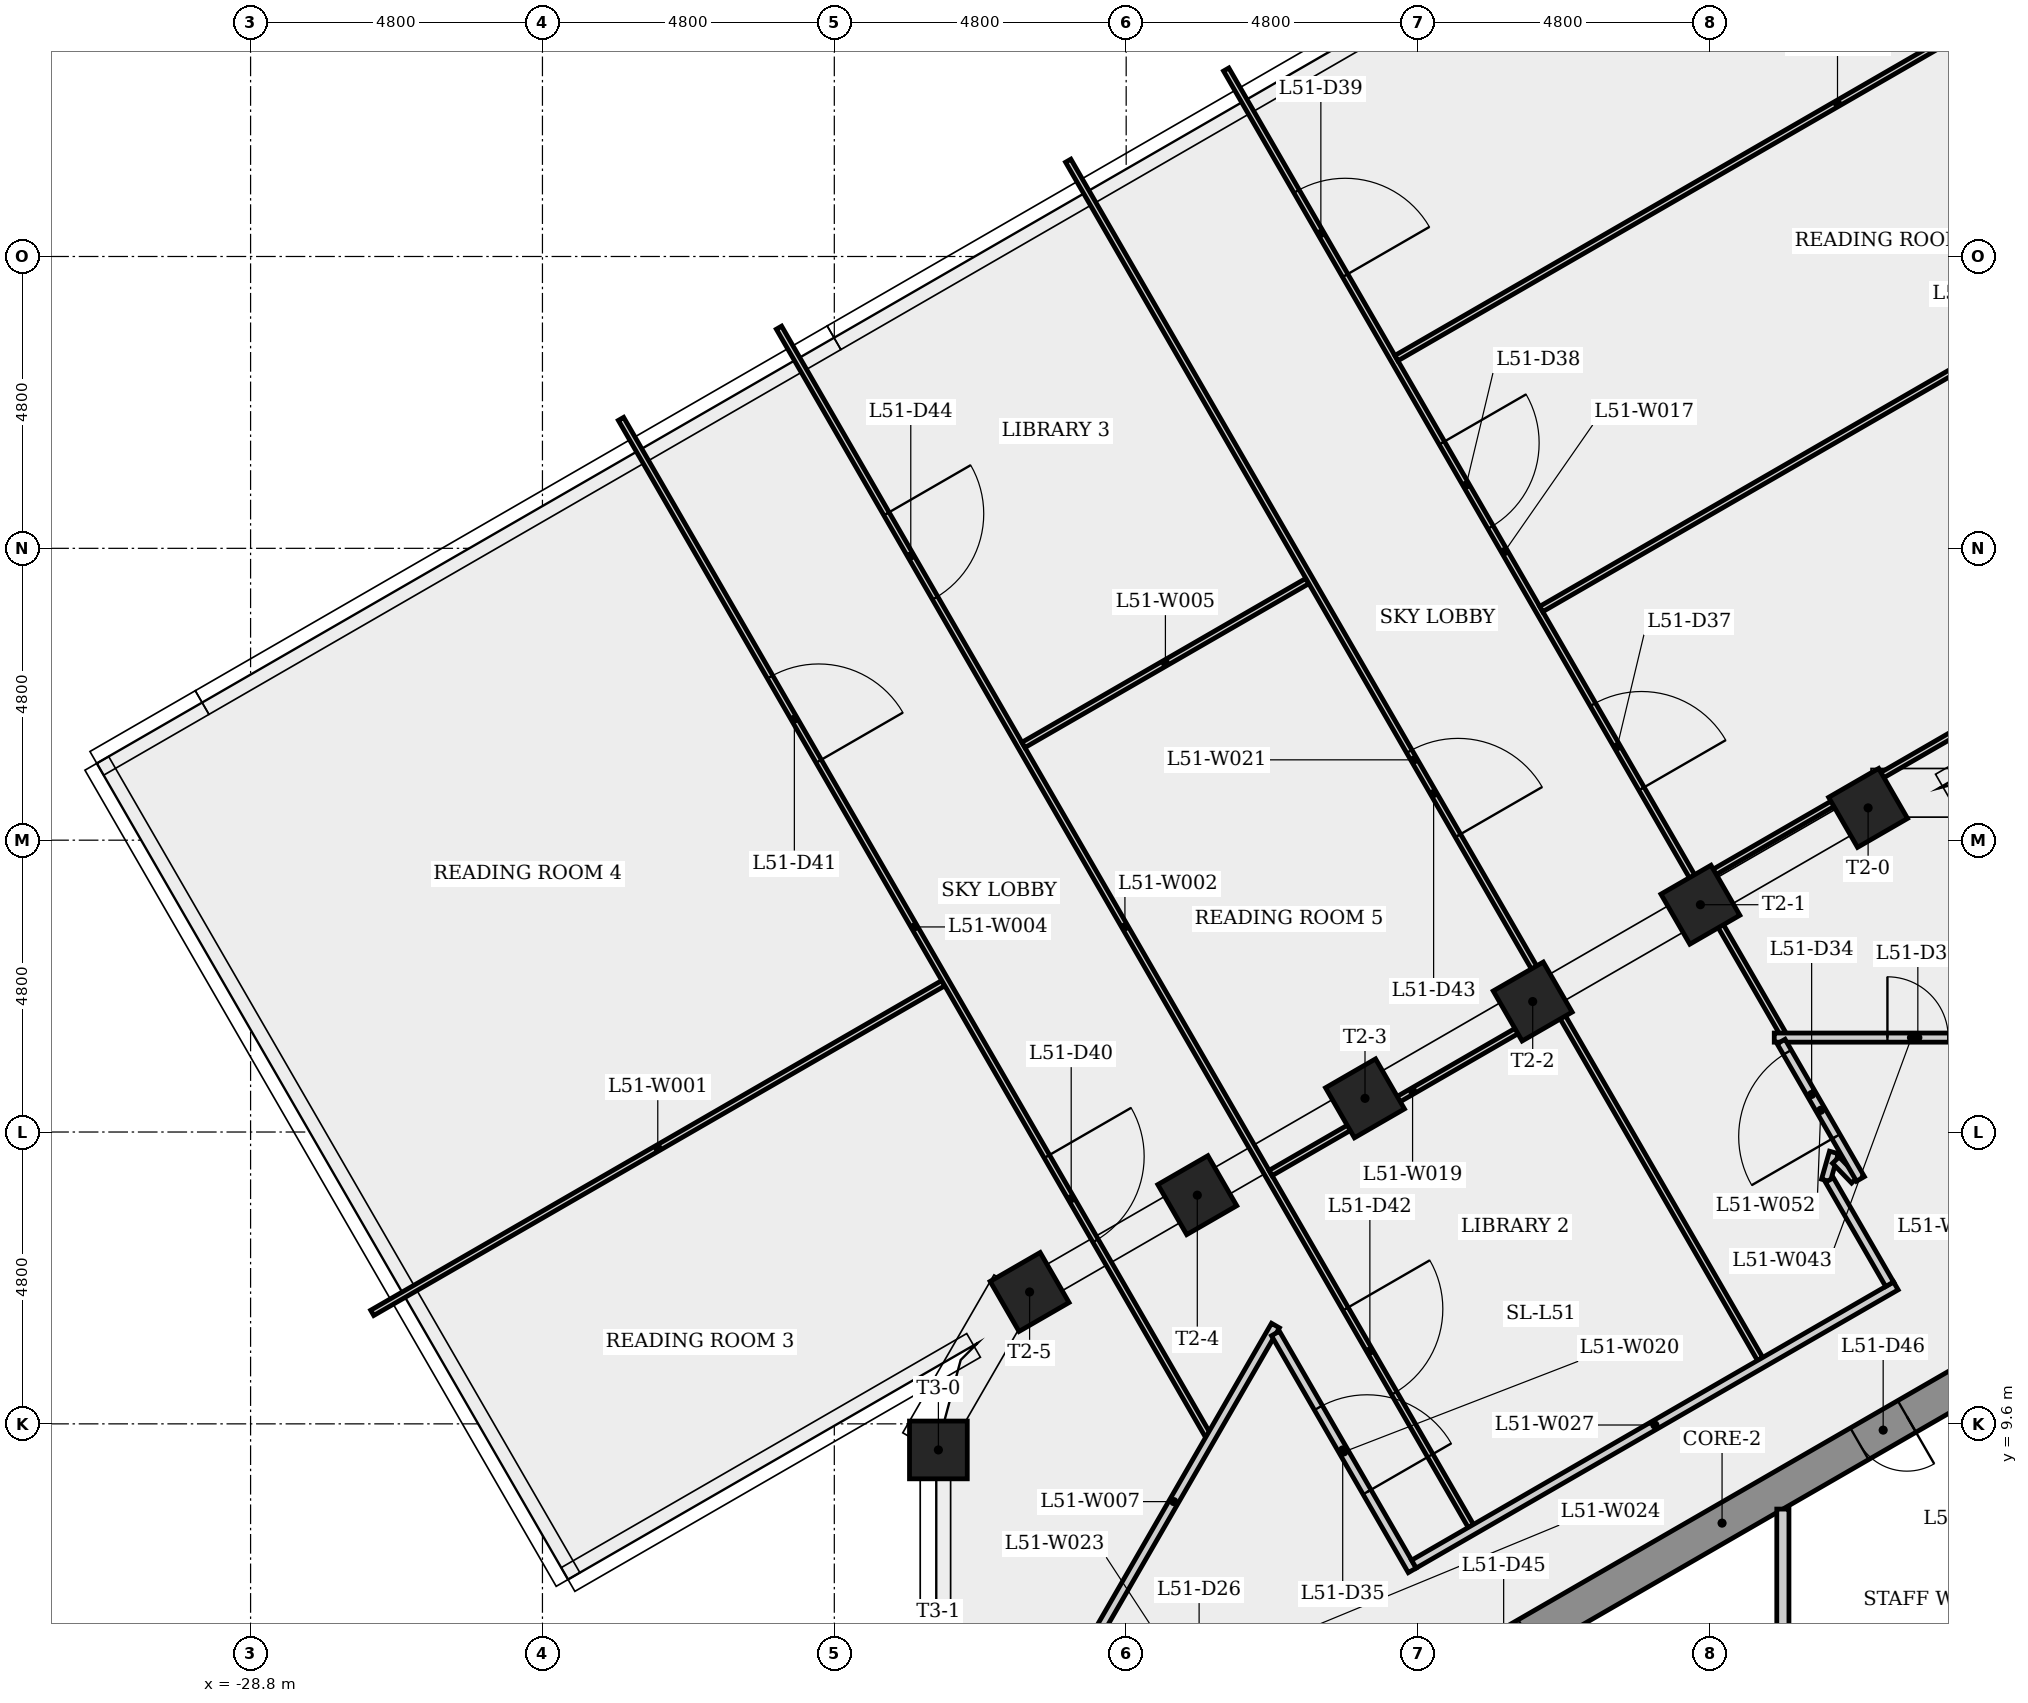
"""IFC4 building model, lengths in metres.
Left out: names, types, materials, properties, quantities, classifications, styles, units other than length and angle.
Written with IfcOpenShell. Run it as: python <this file> out.ifc"""

import sys

from ifc_helpers import new_model, si_unit, direction, frame, frame_2d, origin, origin_2d, place, context, subcontext, project, spatial, rectangle, extrude, element, fill, save


model = new_model("IFC4")
c1 = context("Model", 3, precision=1e-05, world=origin(), true_north=direction((0.0, 1.0)))
c2 = subcontext(c1, "Body", "Model", "MODEL_VIEW")
j1 = project(units=[si_unit("LENGTHUNIT", "METRE"), si_unit("PLANEANGLEUNIT", "RADIAN")], contexts=[c1])
p1 = place(None, origin())
s1 = spatial("IfcSite", under=j1, at=p1, CompositionType="ELEMENT")
p2 = place(p1, origin())
s2 = spatial("IfcBuilding", under=s1, at=p2, CompositionType="ELEMENT")
p3 = place(p2, frame((0.0, 0.0, 190.7)))
s3 = spatial("IfcBuildingStorey", under=s2, at=p3, CompositionType="ELEMENT", Elevation=190.7)
p4 = place(p3, frame((0.15, 10.71, 0.0), z_axis=(0.0, 0.0, 1.0), x_axis=(-0.866023993627, -0.500002442456, 0.0)))
e1 = element("IfcWall", 1, at=p4, inside=s3, PredefinedType="SHEAR", context=c2, shape_type="SweptSolid", body=[
    extrude(rectangle(XDim=10.97, YDim=0.6, at=frame_2d((5.485, 0.0))), origin(), (0.0, 0.0, 1.0), 4.0),
])
p5 = place(p4, frame((9.182, 0.0, 0.0)))
e2 = element("IfcOpeningElement", 2, at=p5, cuts=e1, PredefinedType="OPENING", context=c2, shape_type="SweptSolid", body=[
    extrude(rectangle(XDim=0.9, YDim=2.1, at=frame_2d((0.45, 1.05))), frame((0.0, 0.31, 0.0), z_axis=(0.0, -1.0, 0.0), x_axis=(1.0, 0.0, 0.0)), (0.0, 0.0, 1.0), 0.62),
])
p6 = place(p4, frame((1.975, 0.0, 0.0)))
e3 = element("IfcOpeningElement", 3, at=p6, cuts=e1, PredefinedType="OPENING", context=c2, shape_type="SweptSolid", body=[
    extrude(rectangle(XDim=0.9, YDim=2.1, at=frame_2d((0.45, 1.05))), frame((0.0, 0.31, 0.0), z_axis=(0.0, -1.0, 0.0), x_axis=(1.0, 0.0, 0.0)), (0.0, 0.0, 1.0), 0.62),
])
for number, where, z_axis, x_axis in (
    (4, (-2.198, 19.731, 0.0), (0.0, 0.0, 1.0), (-0.5, 0.866, 0.0)),
    (5, (-4.956, 18.138, 0.0), (0.0, 0.0, 1.0), (-0.5, 0.866, 0.0)),
    (6, (-7.714, 16.546, 0.0), (0.0, 0.0, 1.0), (-0.5, 0.866, 0.0)),
    (7, (-10.472, 14.954, 0.0), (0.0, 0.0, 1.0), (-0.5, 0.866, 0.0)),
    (8, (-13.23, 13.362, 0.0), (0.0, 0.0, 1.0), (-0.5, 0.866, 0.0)),
    (9, (-15.988, 11.769, 0.0), (0.0, 0.0, 1.0), (-0.5, 0.866, 0.0)),
    (10, (-17.488, 9.171, 0.0), (0.0, 0.0, 1.0), (-1.0, 0.0, 0.0)),
):
    element("IfcColumn", number, at=place(p3, frame(where, z_axis=z_axis, x_axis=x_axis)), inside=s3, PredefinedType="COLUMN", context=c2, shape_type="SweptSolid", body=[
        extrude(rectangle(XDim=0.95, YDim=0.95, at=origin_2d()), origin(), (0.0, 0.0, 1.0), 4.0),
    ])
p7 = place(p3, frame((-26.799, 11.426, 0.0), z_axis=(0.0, 0.0, 1.0), x_axis=(0.866016508643, 0.500015406521, 0.0)))
e11 = element("IfcWall", 11, at=p7, inside=s3, PredefinedType="PARTITIONING", context=c2, shape_type="SweptSolid", body=[
    extrude(rectangle(XDim=10.845, YDim=0.1, at=frame_2d((5.422, 0.0))), origin(), (0.0, 0.0, 1.0), 3.6),
])
p8 = place(p3, frame((-20.11, 27.629, 0.0), z_axis=(0.0, 0.0, 1.0), x_axis=(0.499998569178, -0.866026229868, 0.0)))
e12 = element("IfcWall", 12, at=p8, inside=s3, PredefinedType="PARTITIONING", context=c2, shape_type="SweptSolid", body=[
    extrude(rectangle(XDim=22.757, YDim=0.1, at=frame_2d((11.379, 0.0))), origin(), (0.0, 0.0, 1.0), 3.6),
])
p9 = place(p8, frame((18.635, 0.0, 0.0)))
e13 = element("IfcOpeningElement", 13, at=p9, cuts=e12, PredefinedType="OPENING", context=c2, shape_type="SweptSolid", body=[
    extrude(rectangle(XDim=1.6, YDim=2.1, at=frame_2d((0.8, 1.05))), frame((0.0, 0.06, 0.0), z_axis=(0.0, -1.0, 0.0), x_axis=(1.0, 0.0, 0.0)), (0.0, 0.0, 1.0), 0.12),
])
p10 = place(p8, frame((3.535, 0.0, 0.0)))
e14 = element("IfcOpeningElement", 14, at=p10, cuts=e12, PredefinedType="OPENING", context=c2, shape_type="SweptSolid", body=[
    extrude(rectangle(XDim=1.6, YDim=2.1, at=frame_2d((0.8, 1.05))), frame((0.0, 0.06, 0.0), z_axis=(0.0, -1.0, 0.0), x_axis=(1.0, 0.0, 0.0)), (0.0, 0.0, 1.0), 0.12),
])
p11 = place(p3, frame((-22.708, 26.129, 0.0), z_axis=(0.0, 0.0, 1.0), x_axis=(0.500000613642, -0.866025049498, 0.0)))
e15 = element("IfcWall", 15, at=p11, inside=s3, PredefinedType="PARTITIONING", context=c2, shape_type="SweptSolid", body=[
    extrude(rectangle(XDim=19.298, YDim=0.1, at=frame_2d((9.649, 0.0))), origin(), (0.0, 0.0, 1.0), 3.6),
])
p12 = place(p11, frame((14.008, 0.0, 0.0)))
e16 = element("IfcOpeningElement", 16, at=p12, cuts=e15, PredefinedType="OPENING", context=c2, shape_type="SweptSolid", body=[
    extrude(rectangle(XDim=1.6, YDim=2.1, at=frame_2d((0.8, 1.05))), frame((0.0, 0.06, 0.0), z_axis=(0.0, -1.0, 0.0), x_axis=(1.0, 0.0, 0.0)), (0.0, 0.0, 1.0), 0.12),
])
p13 = place(p11, frame((4.902, 0.0, 0.0)))
e17 = element("IfcOpeningElement", 17, at=p13, cuts=e15, PredefinedType="OPENING", context=c2, shape_type="SweptSolid", body=[
    extrude(rectangle(XDim=1.6, YDim=2.1, at=frame_2d((0.8, 1.05))), frame((0.0, 0.06, 0.0), z_axis=(0.0, -1.0, 0.0), x_axis=(1.0, 0.0, 0.0)), (0.0, 0.0, 1.0), 0.12),
])
p14 = place(p3, frame((-16.09, 20.766, 0.0), z_axis=(0.0, 0.0, 1.0), x_axis=(0.866008413041, 0.500029427677, 0.0)))
e18 = element("IfcWall", 18, at=p14, inside=s3, PredefinedType="PARTITIONING", context=c2, shape_type="SweptSolid", body=[
    extrude(rectangle(XDim=5.393, YDim=0.1, at=frame_2d((2.696, 0.0))), origin(), (0.0, 0.0, 1.0), 3.6),
])
p15 = place(p3, frame((-15.288, 5.426, 0.0), z_axis=(0.0, 0.0, 1.0), x_axis=(0.499991080761, 0.866030553248, 0.0)))
e19 = element("IfcWall", 19, at=p15, inside=s3, PredefinedType="PARTITIONING", context=c2, shape_type="SweptSolid", body=[
    extrude(rectangle(XDim=6.687, YDim=0.15, at=frame_2d((3.344, 0.0))), origin(), (0.0, 0.0, 1.0), 3.6),
])
p16 = place(p3, frame((-12.755, 31.875, 0.0), z_axis=(0.0, 0.0, 1.0), x_axis=(0.49999367972, -0.866029052769, 0.0)))
e20 = element("IfcWall", 20, at=p16, inside=s3, PredefinedType="PARTITIONING", context=c2, shape_type="SweptSolid", body=[
    extrude(rectangle(XDim=18.311, YDim=0.1, at=frame_2d((9.155, 0.0))), origin(), (0.0, 0.0, 1.0), 3.6),
])
p17 = place(p16, frame((12.06, 0.0, 0.0)))
e21 = element("IfcOpeningElement", 21, at=p17, cuts=e20, PredefinedType="OPENING", context=c2, shape_type="SweptSolid", body=[
    extrude(rectangle(XDim=1.6, YDim=2.1, at=frame_2d((0.8, 1.05))), frame((0.0, 0.06, 0.0), z_axis=(0.0, -1.0, 0.0), x_axis=(1.0, 0.0, 0.0)), (0.0, 0.0, 1.0), 0.12),
])
p18 = place(p16, frame((7.093, 0.0, 0.0)))
e22 = element("IfcOpeningElement", 22, at=p18, cuts=e20, PredefinedType="OPENING", context=c2, shape_type="SweptSolid", body=[
    extrude(rectangle(XDim=1.6, YDim=2.1, at=frame_2d((0.8, 1.05))), frame((0.0, 0.06, 0.0), z_axis=(0.0, -1.0, 0.0), x_axis=(1.0, 0.0, 0.0)), (0.0, 0.0, 1.0), 0.12),
])
p19 = place(p16, frame((2.313, 0.0, 0.0)))
e23 = element("IfcOpeningElement", 23, at=p19, cuts=e20, PredefinedType="OPENING", context=c2, shape_type="SweptSolid", body=[
    extrude(rectangle(XDim=1.6, YDim=2.1, at=frame_2d((0.8, 1.05))), frame((0.0, 0.06, 0.0), z_axis=(0.0, -1.0, 0.0), x_axis=(1.0, 0.0, 0.0)), (0.0, 0.0, 1.0), 0.12),
])
p20 = place(p3, frame((-12.025, 13.726, 0.0), z_axis=(0.0, 0.0, 1.0), x_axis=(0.866039334336, 0.4999758708, 0.0)))
e24 = element("IfcWall", 24, at=p20, inside=s3, PredefinedType="PARTITIONING", context=c2, shape_type="SweptSolid", body=[
    extrude(rectangle(XDim=5.393, YDim=0.1, at=frame_2d((2.696, 0.0))), origin(), (0.0, 0.0, 1.0), 3.6),
])
p21 = place(p3, frame((-11.945, 11.087, 0.0), z_axis=(0.0, 0.0, 1.0), x_axis=(0.499962028372, -0.866047325604, 0.0)))
e25 = element("IfcWall", 25, at=p21, inside=s3, PredefinedType="PARTITIONING", context=c2, shape_type="SweptSolid", body=[
    extrude(rectangle(XDim=4.499, YDim=0.15, at=frame_2d((2.25, 0.0))), origin(), (0.0, 0.0, 1.0), 3.6),
])
p22 = place(p21, frame((1.412, 0.0, 0.0)))
e26 = element("IfcOpeningElement", 26, at=p22, cuts=e25, PredefinedType="OPENING", context=c2, shape_type="SweptSolid", body=[
    extrude(rectangle(XDim=1.6, YDim=2.1, at=frame_2d((0.8, 1.05))), frame((0.0, 0.085, 0.0), z_axis=(0.0, -1.0, 0.0), x_axis=(1.0, 0.0, 0.0)), (0.0, 0.0, 1.0), 0.17),
])
p23 = place(p3, frame((-15.353, 30.375, 0.0), z_axis=(0.0, 0.0, 1.0), x_axis=(0.499998569178, -0.866026229868, 0.0)))
e27 = element("IfcWall", 27, at=p23, inside=s3, PredefinedType="PARTITIONING", context=c2, shape_type="SweptSolid", body=[
    extrude(rectangle(XDim=22.757, YDim=0.1, at=frame_2d((11.379, 0.0))), origin(), (0.0, 0.0, 1.0), 3.6),
])
p24 = place(p23, frame((11.219, 0.0, 0.0)))
e28 = element("IfcOpeningElement", 28, at=p24, cuts=e27, PredefinedType="OPENING", context=c2, shape_type="SweptSolid", body=[
    extrude(rectangle(XDim=1.6, YDim=2.1, at=frame_2d((0.8, 1.05))), frame((0.0, 0.06, 0.0), z_axis=(0.0, -1.0, 0.0), x_axis=(1.0, 0.0, 0.0)), (0.0, 0.0, 1.0), 0.12),
])
p25 = place(p3, frame((-9.956, 27.128, 0.0), z_axis=(0.0, 0.0, 1.0), x_axis=(0.866025916125, 0.499999112599, 0.0)))
e29 = element("IfcWall", 29, at=p25, inside=s3, PredefinedType="PARTITIONING", context=c2, shape_type="SweptSolid", body=[
    extrude(rectangle(XDim=16.754, YDim=0.1, at=frame_2d((8.377, 0.0))), origin(), (0.0, 0.0, 1.0), 3.6),
])
p26 = place(p3, frame((-9.668, 7.293, 0.0), z_axis=(0.0, 0.0, 1.0), x_axis=(0.866028335764, 0.499994921628, 0.0)))
e30 = element("IfcWall", 30, at=p26, inside=s3, PredefinedType="PARTITIONING", context=c2, shape_type="SweptSolid", body=[
    extrude(rectangle(XDim=9.152, YDim=0.15, at=frame_2d((4.576, 0.0))), origin(), (0.0, 0.0, 1.0), 3.6),
])
for number, where, z_axis, x_axis in (
    (31, (-7.574, 23.002, 0.0), (0.0, 0.0, 1.0), (0.866, 0.5, 0.0)),
    (32, (-4.989, 18.524, 0.0), (0.0, 0.0, 1.0), (0.866, 0.5, 0.0)),
):
    element("IfcWall", number, at=place(p3, frame(where, z_axis=z_axis, x_axis=x_axis)), inside=s3, PredefinedType="PARTITIONING", context=c2, shape_type="SweptSolid", body=[
        extrude(rectangle(XDim=16.754, YDim=0.1, at=frame_2d((8.377, 0.0))), origin(), (0.0, 0.0, 1.0), 3.6),
    ])
p27 = place(p3, frame((-3.741, 15.953, 0.0), z_axis=(0.0, 0.0, 1.0), x_axis=(1.0, 0.0, 0.0)))
e33 = element("IfcWall", 33, at=p27, inside=s3, PredefinedType="PARTITIONING", context=c2, shape_type="SweptSolid", body=[
    extrude(rectangle(XDim=4.513, YDim=0.15, at=frame_2d((2.256, 0.0))), origin(), (0.0, 0.0, 1.0), 3.6),
])
p28 = place(p27, frame((1.861, 0.0, 0.0)))
e34 = element("IfcOpeningElement", 34, at=p28, cuts=e33, PredefinedType="OPENING", context=c2, shape_type="SweptSolid", body=[
    extrude(rectangle(XDim=1.0, YDim=2.1, at=frame_2d((0.5, 1.05))), frame((0.0, 0.085, 0.0), z_axis=(0.0, -1.0, 0.0), x_axis=(1.0, 0.0, 0.0)), (0.0, 0.0, 1.0), 0.17),
])
p29 = place(p3, frame((-3.6, 8.198, 0.0), z_axis=(0.0, 0.0, 1.0), x_axis=(0.0, -1.0, 0.0)))
e35 = element("IfcWall", 35, at=p29, inside=s3, PredefinedType="PARTITIONING", context=c2, shape_type="SweptSolid", body=[
    extrude(rectangle(XDim=2.924, YDim=0.2, at=frame_2d((1.462, 0.0))), origin(), (0.0, 0.0, 1.0), 3.6),
])
p30 = place(p3, frame((-2.892, 13.604, 0.0), z_axis=(0.0, 0.0, 1.0), x_axis=(0.273711184951, 0.961811929242, 0.0)))
e36 = element("IfcWall", 36, at=p30, inside=s3, PredefinedType="PARTITIONING", context=c2, shape_type="SweptSolid", body=[
    extrude(rectangle(XDim=0.479, YDim=0.15, at=frame_2d((0.24, 0.0))), origin(), (0.0, 0.0, 1.0), 3.6),
])
p31 = place(p3, frame((-2.729, 13.938, 0.0), z_axis=(0.0, 0.0, 1.0), x_axis=(0.69403568818, -0.719940597225, 0.0)))
e37 = element("IfcWall", 37, at=p31, inside=s3, PredefinedType="PARTITIONING", context=c2, shape_type="SweptSolid", body=[
    extrude(rectangle(XDim=0.452, YDim=0.15, at=frame_2d((0.226, 0.0))), origin(), (0.0, 0.0, 1.0), 3.6),
])
p32 = place(p3, frame((-2.324, 13.628, 0.0), z_axis=(0.0, 0.0, 1.0), x_axis=(-0.499973559465, 0.866040668696, 0.0)))
e38 = element("IfcWall", 38, at=p32, inside=s3, PredefinedType="PARTITIONING", context=c2, shape_type="SweptSolid", body=[
    extrude(rectangle(XDim=2.609, YDim=0.15, at=frame_2d((1.305, 0.0))), origin(), (0.0, 0.0, 1.0), 3.6),
])
p33 = place(p32, frame((0.805, 0.0, 0.0)))
e39 = element("IfcOpeningElement", 39, at=p33, cuts=e38, PredefinedType="OPENING", context=c2, shape_type="SweptSolid", body=[
    extrude(rectangle(XDim=1.6, YDim=2.1, at=frame_2d((0.8, 1.05))), frame((0.0, 0.085, 0.0), z_axis=(0.0, -1.0, 0.0), x_axis=(1.0, 0.0, 0.0)), (0.0, 0.0, 1.0), 0.17),
])
p34 = place(p3, frame((-1.844, 11.897, 0.0), z_axis=(0.0, 0.0, 1.0), x_axis=(-0.500039200885, 0.86600276996, 0.0)))
e40 = element("IfcWall", 40, at=p34, inside=s3, PredefinedType="PARTITIONING", context=c2, shape_type="SweptSolid", body=[
    extrude(rectangle(XDim=1.979, YDim=0.15, at=frame_2d((0.99, 0.0))), origin(), (0.0, 0.0, 1.0), 3.6),
])
p35 = place(p33, origin())
e41 = element("IfcDoor", 41, at=p35, inside=s3, OperationType="SINGLE_SWING_LEFT", PredefinedType="DOOR", context=c2, shape_type="SweptSolid", body=[
    extrude(rectangle(XDim=1.6, YDim=2.1, at=frame_2d((0.8, 1.05))), frame((0.0, 0.025, 0.0), z_axis=(0.0, -1.0, 0.0), x_axis=(1.0, 0.0, 0.0)), (0.0, 0.0, 1.0), 0.05),
])
fill(e39, e41)
p36 = place(p22, origin())
e42 = element("IfcDoor", 42, at=p36, inside=s3, OperationType="SINGLE_SWING_RIGHT", PredefinedType="DOOR", context=c2, shape_type="SweptSolid", body=[
    extrude(rectangle(XDim=1.6, YDim=2.1, at=frame_2d((0.8, 1.05))), frame((0.0, 0.025, 0.0), z_axis=(0.0, -1.0, 0.0), x_axis=(1.0, 0.0, 0.0)), (0.0, 0.0, 1.0), 0.05),
])
fill(e26, e42)
p37 = place(p28, origin())
e43 = element("IfcDoor", 43, at=p37, inside=s3, OperationType="SINGLE_SWING_LEFT", PredefinedType="DOOR", context=c2, shape_type="SweptSolid", body=[
    extrude(rectangle(XDim=1.0, YDim=2.1, at=frame_2d((0.5, 1.05))), frame((0.0, 0.025, 0.0), z_axis=(0.0, -1.0, 0.0), x_axis=(1.0, 0.0, 0.0)), (0.0, 0.0, 1.0), 0.05),
])
fill(e34, e43)
p38 = place(p17, origin())
e44 = element("IfcDoor", 44, at=p38, inside=s3, OperationType="SINGLE_SWING_RIGHT", PredefinedType="DOOR", context=c2, shape_type="SweptSolid", body=[
    extrude(rectangle(XDim=1.6, YDim=2.1, at=frame_2d((0.8, 1.05))), frame((0.0, 0.025, 0.0), z_axis=(0.0, -1.0, 0.0), x_axis=(1.0, 0.0, 0.0)), (0.0, 0.0, 1.0), 0.05),
])
fill(e21, e44)
p39 = place(p18, origin())
e45 = element("IfcDoor", 45, at=p39, inside=s3, OperationType="SINGLE_SWING_LEFT", PredefinedType="DOOR", context=c2, shape_type="SweptSolid", body=[
    extrude(rectangle(XDim=1.6, YDim=2.1, at=frame_2d((0.8, 1.05))), frame((0.0, 0.025, 0.0), z_axis=(0.0, -1.0, 0.0), x_axis=(1.0, 0.0, 0.0)), (0.0, 0.0, 1.0), 0.05),
])
fill(e22, e45)
p40 = place(p19, origin())
e46 = element("IfcDoor", 46, at=p40, inside=s3, OperationType="SINGLE_SWING_RIGHT", PredefinedType="DOOR", context=c2, shape_type="SweptSolid", body=[
    extrude(rectangle(XDim=1.6, YDim=2.1, at=frame_2d((0.8, 1.05))), frame((0.0, 0.025, 0.0), z_axis=(0.0, -1.0, 0.0), x_axis=(1.0, 0.0, 0.0)), (0.0, 0.0, 1.0), 0.05),
])
fill(e23, e46)
p41 = place(p12, origin())
e47 = element("IfcDoor", 47, at=p41, inside=s3, OperationType="SINGLE_SWING_LEFT", PredefinedType="DOOR", context=c2, shape_type="SweptSolid", body=[
    extrude(rectangle(XDim=1.6, YDim=2.1, at=frame_2d((0.8, 1.05))), frame((0.0, 0.025, 0.0), z_axis=(0.0, -1.0, 0.0), x_axis=(1.0, 0.0, 0.0)), (0.0, 0.0, 1.0), 0.05),
])
fill(e16, e47)
p42 = place(p13, origin())
e48 = element("IfcDoor", 48, at=p42, inside=s3, OperationType="SINGLE_SWING_RIGHT", PredefinedType="DOOR", context=c2, shape_type="SweptSolid", body=[
    extrude(rectangle(XDim=1.6, YDim=2.1, at=frame_2d((0.8, 1.05))), frame((0.0, 0.025, 0.0), z_axis=(0.0, -1.0, 0.0), x_axis=(1.0, 0.0, 0.0)), (0.0, 0.0, 1.0), 0.05),
])
fill(e17, e48)
p43 = place(p9, origin())
e49 = element("IfcDoor", 49, at=p43, inside=s3, OperationType="SINGLE_SWING_LEFT", PredefinedType="DOOR", context=c2, shape_type="SweptSolid", body=[
    extrude(rectangle(XDim=1.6, YDim=2.1, at=frame_2d((0.8, 1.05))), frame((0.0, 0.025, 0.0), z_axis=(0.0, -1.0, 0.0), x_axis=(1.0, 0.0, 0.0)), (0.0, 0.0, 1.0), 0.05),
])
fill(e13, e49)
p44 = place(p24, origin())
e50 = element("IfcDoor", 50, at=p44, inside=s3, OperationType="SINGLE_SWING_RIGHT", PredefinedType="DOOR", context=c2, shape_type="SweptSolid", body=[
    extrude(rectangle(XDim=1.6, YDim=2.1, at=frame_2d((0.8, 1.05))), frame((0.0, 0.025, 0.0), z_axis=(0.0, -1.0, 0.0), x_axis=(1.0, 0.0, 0.0)), (0.0, 0.0, 1.0), 0.05),
])
fill(e28, e50)
p45 = place(p10, origin())
e51 = element("IfcDoor", 51, at=p45, inside=s3, OperationType="SINGLE_SWING_LEFT", PredefinedType="DOOR", context=c2, shape_type="SweptSolid", body=[
    extrude(rectangle(XDim=1.6, YDim=2.1, at=frame_2d((0.8, 1.05))), frame((0.0, 0.025, 0.0), z_axis=(0.0, -1.0, 0.0), x_axis=(1.0, 0.0, 0.0)), (0.0, 0.0, 1.0), 0.05),
])
fill(e14, e51)
p46 = place(p6, origin())
e52 = element("IfcDoor", 52, at=p46, inside=s3, OperationType="SINGLE_SWING_LEFT", PredefinedType="DOOR", context=c2, shape_type="SweptSolid", body=[
    extrude(rectangle(XDim=0.9, YDim=2.1, at=frame_2d((0.45, 1.05))), frame((0.0, 0.025, 0.0), z_axis=(0.0, -1.0, 0.0), x_axis=(1.0, 0.0, 0.0)), (0.0, 0.0, 1.0), 0.05),
])
fill(e3, e52)
save(model, sys.argv[1])
